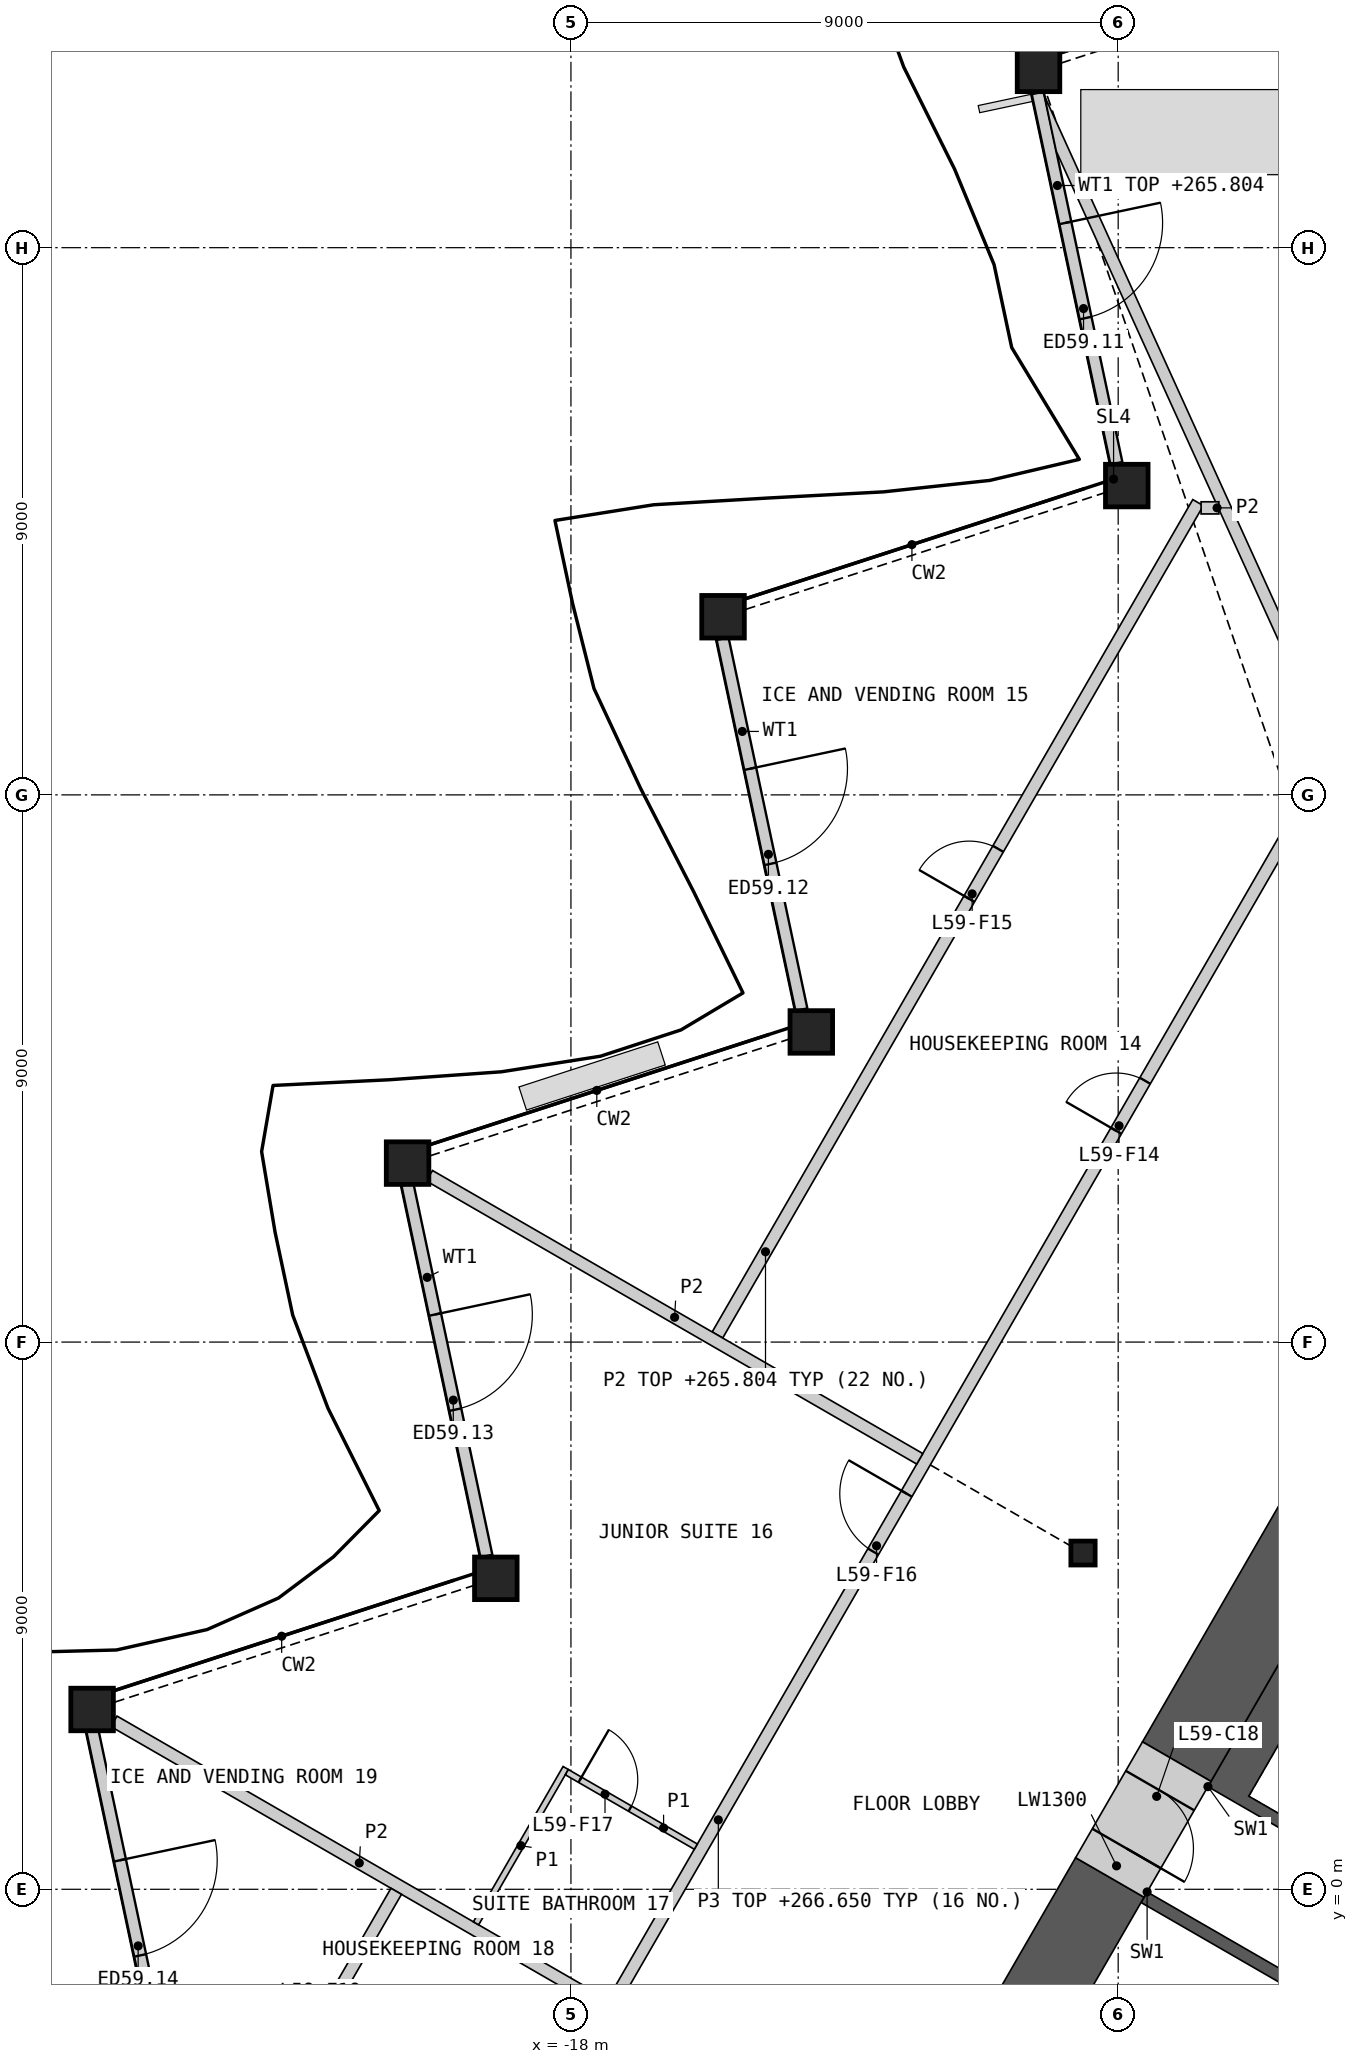
"""IFC4 building model, lengths in metres.
Left out: names, types, materials, properties, quantities, classifications, styles, units other than length and angle.
Written with IfcOpenShell. Run it as: python <this file> out.ifc"""

import sys

from ifc_helpers import new_model, si_unit, direction, frame, frame_2d, origin, origin_2d, place, context, subcontext, project, spatial, polyline, rectangle, hollow_rectangle, i_section, outline, extrude, element, fill, save


model = new_model("IFC4")
c1 = context("Model", 3, precision=1e-05, world=origin(), true_north=direction((0.0, 1.0)))
c2 = subcontext(c1, "Body", "Model", "MODEL_VIEW")
j1 = project(units=[si_unit("LENGTHUNIT", "METRE"), si_unit("PLANEANGLEUNIT", "RADIAN")], contexts=[c1])
p1 = place(None, origin())
s1 = spatial("IfcSite", under=j1, at=p1, CompositionType="ELEMENT")
p2 = place(p1, origin())
s2 = spatial("IfcBuilding", under=s1, at=p2, CompositionType="ELEMENT")
p3 = place(p2, frame((0.0, 0.0, 263.4)))
s3 = spatial("IfcBuildingStorey", under=s2, at=p3, CompositionType="ELEMENT", Elevation=263.4)
for number, where, z_axis, x_axis in (
    (1, (-10.31, 29.916, 0.0), (0.0, 0.0, 1.0), (1.0, 0.0, 0.0)),
    (2, (-8.859, 23.087, 0.0), (0.0, 0.0, 1.0), (1.0, 0.0, 0.0)),
    (3, (-15.499, 20.93, 0.0), (0.0, 0.0, 1.0), (1.0, 0.0, 0.0)),
    (4, (-14.047, 14.101, 0.0), (0.0, 0.0, 1.0), (1.0, 0.0, 0.0)),
    (5, (-20.687, 11.943, 0.0), (0.0, 0.0, 1.0), (1.0, 0.0, 0.0)),
    (6, (-19.235, 5.115, 0.0), (0.0, 0.0, 1.0), (1.0, 0.0, 0.0)),
    (7, (-25.875, 2.957, 0.0), (0.0, 0.0, 1.0), (1.0, 0.0, 0.0)),
):
    element("IfcColumn", number, at=place(p3, frame(where, z_axis=z_axis, x_axis=x_axis)), inside=s3, PredefinedType="COLUMN", context=c2, shape_type="SweptSolid", body=[
        extrude(hollow_rectangle(XDim=0.7, YDim=0.7, WallThickness=0.045, at=origin_2d()), origin(), (0.0, 0.0, 1.0), 3.6),
    ])
p4 = place(p3, frame((-9.578, 5.53, 0.0), z_axis=(0.0, 0.0, 1.0), x_axis=(1.0, 0.0, 0.0)))
e8 = element("IfcColumn", 8, at=p4, inside=s3, PredefinedType="COLUMN", context=c2, shape_type="SweptSolid", body=[
    extrude(i_section(OverallWidth=0.399, OverallDepth=0.393, WebThickness=0.023, FlangeThickness=0.037, at=origin_2d()), origin(), (0.0, 0.0, 1.0), 3.6),
])
p5 = place(p3, frame((-10.324, 29.545, 0.0), z_axis=(0.0, 0.0, 1.0), x_axis=(0.207930490886, -0.978143604467, 0.0)))
e9 = element("IfcWall", 9, at=p5, inside=s3, PredefinedType="SOLIDWALL", context=c2, shape_type="SweptSolid", body=[
    extrude(rectangle(XDim=6.228, YDim=0.2, at=frame_2d((3.114, 0.0))), origin(), (0.0, 0.0, 1.0), 2.404),
])
p6 = place(p5, frame((2.186, 0.0, 0.0)))
e10 = element("IfcOpeningElement", 10, at=p6, cuts=e9, PredefinedType="OPENING", context=c2, shape_type="SweptSolid", body=[
    extrude(rectangle(XDim=1.6, YDim=2.4, at=frame_2d((0.8, 1.2))), frame((0.0, 0.11, 0.0), z_axis=(0.0, -1.0, 0.0), x_axis=(1.0, 0.0, 0.0)), (0.0, 0.0, 1.0), 0.22),
])
p7 = place(p3, frame((-15.506, 20.569, 0.0), z_axis=(0.0, 0.0, 1.0), x_axis=(0.207911652145, -0.978147608954, 0.0)))
e11 = element("IfcWall", 11, at=p7, inside=s3, PredefinedType="SOLIDWALL", context=c2, shape_type="SweptSolid", body=[
    extrude(rectangle(XDim=6.238, YDim=0.2, at=frame_2d((3.119, 0.0))), origin(), (0.0, 0.0, 1.0), 2.701),
])
p8 = place(p7, frame((2.186, 0.0, 0.0)))
e12 = element("IfcOpeningElement", 12, at=p8, cuts=e11, PredefinedType="OPENING", context=c2, shape_type="SweptSolid", body=[
    extrude(rectangle(XDim=1.6, YDim=2.4, at=frame_2d((0.8, 1.2))), frame((0.0, 0.11, 0.0), z_axis=(0.0, -1.0, 0.0), x_axis=(1.0, 0.0, 0.0)), (0.0, 0.0, 1.0), 0.22),
])
p9 = place(p3, frame((-20.689, 11.592, 0.0), z_axis=(0.0, 0.0, 1.0), x_axis=(0.207900820141, -0.978149911304, 0.0)))
e13 = element("IfcWall", 13, at=p9, inside=s3, PredefinedType="SOLIDWALL", context=c2, shape_type="SweptSolid", body=[
    extrude(rectangle(XDim=6.247, YDim=0.2, at=frame_2d((3.124, 0.0))), origin(), (0.0, 0.0, 1.0), 2.701),
])
p10 = place(p9, frame((2.186, 0.0, 0.0)))
e14 = element("IfcOpeningElement", 14, at=p10, cuts=e13, PredefinedType="OPENING", context=c2, shape_type="SweptSolid", body=[
    extrude(rectangle(XDim=1.6, YDim=2.4, at=frame_2d((0.8, 1.2))), frame((0.0, 0.11, 0.0), z_axis=(0.0, -1.0, 0.0), x_axis=(1.0, 0.0, 0.0)), (0.0, 0.0, 1.0), 0.22),
])
p11 = place(p3, frame((-25.872, 2.615, 0.0), z_axis=(0.0, 0.0, 1.0), x_axis=(0.207882087744, -0.978153892593, 0.0)))
e15 = element("IfcWall", 15, at=p11, inside=s3, PredefinedType="SOLIDWALL", context=c2, shape_type="SweptSolid", body=[
    extrude(rectangle(XDim=6.257, YDim=0.2, at=frame_2d((3.129, 0.0))), origin(), (0.0, 0.0, 1.0), 2.701),
])
p12 = place(p11, frame((2.186, 0.0, 0.0)))
e16 = element("IfcOpeningElement", 16, at=p12, cuts=e15, PredefinedType="OPENING", context=c2, shape_type="SweptSolid", body=[
    extrude(rectangle(XDim=1.6, YDim=2.4, at=frame_2d((0.8, 1.2))), frame((0.0, 0.11, 0.0), z_axis=(0.0, -1.0, 0.0), x_axis=(1.0, 0.0, 0.0)), (0.0, 0.0, 1.0), 0.22),
])
p13 = place(p3, origin())
e17 = element("IfcWall", 17, at=p13, inside=s3, PredefinedType="SHEAR", context=c2, shape_type="SweptSolid", body=[
    extrude(outline(polyline([(-7.524, 1.688), (-4.124, 7.577), (-3.731, 7.35), (-1.561, 6.097), (-1.66, 5.924), (-3.652, 7.074), (-4.652, 5.342), (-2.66, 4.192), (-2.76, 4.019), (-4.752, 5.169), (-5.752, 3.437), (-3.76, 2.287), (-3.861, 2.113), (-5.852, 3.263), (-6.852, 1.531), (-4.861, 0.381), (-4.96, 0.208), (-7.131, 1.461), (-7.524, 1.688)])), origin(), (0.0, 0.0, 1.0), 3.25),
])
p14 = place(p3, origin())
e18 = element("IfcWall", 18, at=p14, inside=s3, PredefinedType="SHEAR", context=c2, shape_type="SweptSolid", body=[
    extrude(outline(polyline([(-8.524, -0.044), (-8.131, -0.271), (-5.96, -1.524), (-6.061, -1.697), (-8.231, -0.444), (-8.624, -0.217), (-8.524, -0.044)])), origin(), (0.0, 0.0, 1.0), 3.25),
])
p15 = place(p3, origin())
e19 = element("IfcWall", 19, at=p15, inside=s3, PredefinedType="SHEAR", context=c2, shape_type="SweptSolid", body=[
    extrude(outline(polyline([(-5.307, -1.281), (-10.374, -4.206), (-10.032, -4.298), (-5.182, -1.498), (-5.307, -1.281)])), origin(), (0.0, 0.0, 1.0), 3.25),
])
p16 = place(p3, frame((-4.636, 7.99, 0.0), z_axis=(0.0, 0.0, 1.0), x_axis=(-0.500022813292, -0.866012232124, 0.0)))
e20 = element("IfcWall", 20, at=p16, inside=s3, PredefinedType="SHEAR", context=c2, shape_type="SweptSolid", body=[
    extrude(rectangle(XDim=6.802, YDim=1.3, at=frame_2d((3.401, 0.0))), origin(), (0.0, 0.0, 1.0), 3.25),
])
p17 = place(p3, frame((-9.137, 0.195, 0.0), z_axis=(0.0, 0.0, 1.0), x_axis=(-0.499985697398, -0.866033661238, 0.0)))
e21 = element("IfcWall", 21, at=p17, inside=s3, PredefinedType="SHEAR", context=c2, shape_type="SweptSolid", body=[
    extrude(rectangle(XDim=4.362, YDim=1.3, at=frame_2d((2.181, 0.0))), origin(), (0.0, 0.0, 1.0), 3.25),
])
p18 = place(p3, frame((-8.037, 2.1, 0.0), z_axis=(0.0, 0.0, 1.0), x_axis=(-0.50002983664, -0.866008176907, 0.0)))
e22 = element("IfcWall", 22, at=p18, inside=s3, PredefinedType="SHEAR", context=c2, shape_type="SweptSolid", body=[
    extrude(rectangle(XDim=2.2, YDim=1.3, at=frame_2d((1.1, 0.0))), origin(), (0.0, 0.0, 1.0), 3.25),
])
p19 = place(p18, frame((0.55, 0.0, 0.0)))
e23 = element("IfcOpeningElement", 23, at=p19, cuts=e22, PredefinedType="OPENING", context=c2, shape_type="SweptSolid", body=[
    extrude(rectangle(XDim=1.1, YDim=2.1, at=frame_2d((0.55, 1.05))), frame((0.0, 0.66, 0.0), z_axis=(0.0, -1.0, 0.0), x_axis=(1.0, 0.0, 0.0)), (0.0, 0.0, 1.0), 1.32),
])
p20 = place(p3, frame((-18.976, -4.747, 0.0), z_axis=(0.0, 0.0, 1.0), x_axis=(0.499999852422, 0.866025488988, 0.0)))
e24 = element("IfcWall", 24, at=p20, inside=s3, PredefinedType="PARTITIONING", context=c2, shape_type="SweptSolid", body=[
    extrude(rectangle(XDim=27.198, YDim=0.2, at=frame_2d((13.599, 0.0))), origin(), (0.0, 0.0, 1.0), 3.25),
])
p21 = place(p20, frame((19.886, 0.0, 0.0)))
e25 = element("IfcOpeningElement", 25, at=p21, cuts=e24, PredefinedType="OPENING", context=c2, shape_type="SweptSolid", body=[
    extrude(rectangle(XDim=0.95, YDim=2.1, at=frame_2d((0.475, 1.05))), frame((0.0, 0.11, 0.0), z_axis=(0.0, -1.0, 0.0), x_axis=(1.0, 0.0, 0.0)), (0.0, 0.0, 1.0), 0.22),
])
p22 = place(p20, frame((11.895, 0.0, 0.0)))
e26 = element("IfcOpeningElement", 26, at=p22, cuts=e24, PredefinedType="OPENING", context=c2, shape_type="SweptSolid", body=[
    extrude(rectangle(XDim=1.1, YDim=2.1, at=frame_2d((0.55, 1.05))), frame((0.0, 0.11, 0.0), z_axis=(0.0, -1.0, 0.0), x_axis=(1.0, 0.0, 0.0)), (0.0, 0.0, 1.0), 0.22),
])
p23 = place(p20, frame((1.152, 0.0, 0.0)))
e27 = element("IfcOpeningElement", 27, at=p23, cuts=e24, PredefinedType="OPENING", context=c2, shape_type="SweptSolid", body=[
    extrude(rectangle(XDim=0.95, YDim=2.1, at=frame_2d((0.475, 1.05))), frame((0.0, 0.11, 0.0), z_axis=(0.0, -1.0, 0.0), x_axis=(1.0, 0.0, 0.0)), (0.0, 0.0, 1.0), 0.22),
])
p24 = place(p3, frame((-15.591, 9.117, 0.0), z_axis=(0.0, 0.0, 1.0), x_axis=(0.499994281579, 0.866028705291, 0.0)))
e28 = element("IfcWall", 28, at=p24, inside=s3, PredefinedType="PARTITIONING", context=c2, shape_type="SweptSolid", body=[
    extrude(rectangle(XDim=15.808, YDim=0.2, at=frame_2d((7.904, 0.0))), origin(), (0.0, 0.0, 1.0), 2.404),
])
p25 = place(p24, frame((8.283, 0.0, 0.0)))
e29 = element("IfcOpeningElement", 29, at=p25, cuts=e28, PredefinedType="OPENING", context=c2, shape_type="SweptSolid", body=[
    extrude(rectangle(XDim=0.95, YDim=2.1, at=frame_2d((0.475, 1.05))), frame((0.0, 0.11, 0.0), z_axis=(0.0, -1.0, 0.0), x_axis=(1.0, 0.0, 0.0)), (0.0, 0.0, 1.0), 0.22),
])
p26 = place(p3, origin())
e30 = element("IfcWall", 30, at=p26, inside=s3, PredefinedType="PARTITIONING", context=c2, shape_type="SweptSolid", body=[
    extrude(outline(polyline([(-5.56, 18.77), (-10.017, 28.582), (-10.21, 29.491), (-5.377, 18.853), (-5.56, 18.77)])), origin(), (0.0, 0.0, 1.0), 2.404),
])
p27 = place(p3, frame((-25.515, 2.762, 0.0), z_axis=(0.0, 0.0, 1.0), x_axis=(0.866025446298, -0.499999926364, 0.0)))
e31 = element("IfcWall", 31, at=p27, inside=s3, PredefinedType="PARTITIONING", context=c2, shape_type="SweptSolid", body=[
    extrude(rectangle(XDim=9.317, YDim=0.2, at=frame_2d((4.659, 0.0))), origin(), (0.0, 0.0, 1.0), 2.404),
])
p28 = place(p3, frame((-20.327, 11.736, 0.0), z_axis=(0.0, 0.0, 1.0), x_axis=(0.866022277917, -0.500005414122, 0.0)))
e32 = element("IfcWall", 32, at=p28, inside=s3, PredefinedType="PARTITIONING", context=c2, shape_type="SweptSolid", body=[
    extrude(rectangle(XDim=9.311, YDim=0.2, at=frame_2d((4.656, 0.0))), origin(), (0.0, 0.0, 1.0), 2.404),
])
p29 = place(p3, frame((-23.595, -4.747, 0.0), z_axis=(0.0, 0.0, 1.0), x_axis=(0.500003308737, 0.866023493476, 0.0)))
e33 = element("IfcWall", 33, at=p29, inside=s3, PredefinedType="PARTITIONING", context=c2, shape_type="SweptSolid", body=[
    extrude(rectangle(XDim=5.443, YDim=0.2, at=frame_2d((2.721, 0.0))), origin(), (0.0, 0.0, 1.0), 2.404),
])
p30 = place(p29, frame((2.093, 0.0, 0.0)))
e34 = element("IfcOpeningElement", 34, at=p30, cuts=e33, PredefinedType="OPENING", context=c2, shape_type="SweptSolid", body=[
    extrude(rectangle(XDim=0.95, YDim=2.1, at=frame_2d((0.475, 1.05))), frame((0.0, 0.11, 0.0), z_axis=(0.0, -1.0, 0.0), x_axis=(1.0, 0.0, 0.0)), (0.0, 0.0, 1.0), 0.22),
])
p31 = place(p3, frame((-7.636, 22.72, 0.0), z_axis=(0.0, 0.0, 1.0), x_axis=(1.0, 0.0, 0.0)))
e35 = element("IfcWall", 35, at=p31, inside=s3, PredefinedType="PARTITIONING", context=c2, shape_type="SweptSolid", body=[
    extrude(rectangle(XDim=0.292, YDim=0.2, at=frame_2d((0.146, 0.0))), origin(), (0.0, 0.0, 1.0), 2.404),
])
p32 = place(p3, frame((-19.561, -0.56, 0.0), z_axis=(0.0, 0.0, 1.0), x_axis=(0.49997559174, 0.866039495442, 0.0)))
e36 = element("IfcWall", 36, at=p32, inside=s3, PredefinedType="PARTITIONING", context=c2, shape_type="SweptSolid", body=[
    extrude(rectangle(XDim=2.95, YDim=0.1, at=frame_2d((1.475, 0.0))), origin(), (0.0, 0.0, 1.0), 2.404),
])
p33 = place(p3, frame((-18.068, 1.927, 0.0), z_axis=(0.0, 0.0, 1.0), x_axis=(0.866014668023, -0.500018594424, 0.0)))
e37 = element("IfcWall", 37, at=p33, inside=s3, PredefinedType="PARTITIONING", context=c2, shape_type="SweptSolid", body=[
    extrude(rectangle(XDim=2.45, YDim=0.1, at=frame_2d((1.225, 0.0))), origin(), (0.0, 0.0, 1.0), 2.404),
])
p34 = place(p33, frame((0.25, 0.0, 0.0)))
e38 = element("IfcOpeningElement", 38, at=p34, cuts=e37, PredefinedType="OPENING", context=c2, shape_type="SweptSolid", body=[
    extrude(rectangle(XDim=0.95, YDim=2.1, at=frame_2d((0.475, 1.05))), frame((0.0, 0.06, 0.0), z_axis=(0.0, -1.0, 0.0), x_axis=(1.0, 0.0, 0.0)), (0.0, 0.0, 1.0), 0.12),
])
p35 = place(p6, origin())
e39 = element("IfcDoor", 39, at=p35, inside=s3, OperationType="DOUBLE_DOOR_SINGLE_SWING", PredefinedType="DOOR", context=c2, shape_type="SweptSolid", body=[
    extrude(rectangle(XDim=1.6, YDim=2.4, at=frame_2d((0.8, 1.2))), frame((0.0, 0.025, 0.0), z_axis=(0.0, -1.0, 0.0), x_axis=(1.0, 0.0, 0.0)), (0.0, 0.0, 1.0), 0.05),
])
fill(e10, e39)
p36 = place(p8, origin())
e40 = element("IfcDoor", 40, at=p36, inside=s3, OperationType="DOUBLE_DOOR_SINGLE_SWING", PredefinedType="DOOR", context=c2, shape_type="SweptSolid", body=[
    extrude(rectangle(XDim=1.6, YDim=2.4, at=frame_2d((0.8, 1.2))), frame((0.0, 0.025, 0.0), z_axis=(0.0, -1.0, 0.0), x_axis=(1.0, 0.0, 0.0)), (0.0, 0.0, 1.0), 0.05),
])
fill(e12, e40)
p37 = place(p10, origin())
e41 = element("IfcDoor", 41, at=p37, inside=s3, OperationType="DOUBLE_DOOR_SINGLE_SWING", PredefinedType="DOOR", context=c2, shape_type="SweptSolid", body=[
    extrude(rectangle(XDim=1.6, YDim=2.4, at=frame_2d((0.8, 1.2))), frame((0.0, 0.025, 0.0), z_axis=(0.0, -1.0, 0.0), x_axis=(1.0, 0.0, 0.0)), (0.0, 0.0, 1.0), 0.05),
])
fill(e14, e41)
p38 = place(p12, origin())
e42 = element("IfcDoor", 42, at=p38, inside=s3, OperationType="DOUBLE_DOOR_SINGLE_SWING", PredefinedType="DOOR", context=c2, shape_type="SweptSolid", body=[
    extrude(rectangle(XDim=1.6, YDim=2.4, at=frame_2d((0.8, 1.2))), frame((0.0, 0.025, 0.0), z_axis=(0.0, -1.0, 0.0), x_axis=(1.0, 0.0, 0.0)), (0.0, 0.0, 1.0), 0.05),
])
fill(e16, e42)
p39 = place(p19, origin())
e43 = element("IfcDoor", 43, at=p39, inside=s3, OperationType="SINGLE_SWING_RIGHT", PredefinedType="DOOR", context=c2, shape_type="SweptSolid", body=[
    extrude(rectangle(XDim=1.1, YDim=2.1, at=frame_2d((0.55, 1.05))), frame((0.0, 0.405, 0.0), z_axis=(0.0, -1.0, 0.0), x_axis=(1.0, 0.0, 0.0)), (0.0, 0.0, 1.0), 0.05),
])
fill(e23, e43)
p40 = place(p21, origin())
e44 = element("IfcDoor", 44, at=p40, inside=s3, OperationType="SINGLE_SWING_LEFT", PredefinedType="DOOR", context=c2, shape_type="SweptSolid", body=[
    extrude(rectangle(XDim=0.95, YDim=2.1, at=frame_2d((0.475, 1.05))), frame((0.0, 0.025, 0.0), z_axis=(0.0, -1.0, 0.0), x_axis=(1.0, 0.0, 0.0)), (0.0, 0.0, 1.0), 0.05),
])
fill(e25, e44)
p41 = place(p25, origin())
e45 = element("IfcDoor", 45, at=p41, inside=s3, OperationType="SINGLE_SWING_LEFT", PredefinedType="DOOR", context=c2, shape_type="SweptSolid", body=[
    extrude(rectangle(XDim=0.95, YDim=2.1, at=frame_2d((0.475, 1.05))), frame((0.0, 0.025, 0.0), z_axis=(0.0, -1.0, 0.0), x_axis=(1.0, 0.0, 0.0)), (0.0, 0.0, 1.0), 0.05),
])
fill(e29, e45)
p42 = place(p22, origin())
e46 = element("IfcDoor", 46, at=p42, inside=s3, OperationType="SINGLE_SWING_RIGHT", PredefinedType="DOOR", context=c2, shape_type="SweptSolid", body=[
    extrude(rectangle(XDim=1.1, YDim=2.1, at=frame_2d((0.55, 1.05))), frame((0.0, 0.025, 0.0), z_axis=(0.0, -1.0, 0.0), x_axis=(1.0, 0.0, 0.0)), (0.0, 0.0, 1.0), 0.05),
])
fill(e26, e46)
p43 = place(p34, origin())
e47 = element("IfcDoor", 47, at=p43, inside=s3, OperationType="SINGLE_SWING_LEFT", PredefinedType="DOOR", context=c2, shape_type="SweptSolid", body=[
    extrude(rectangle(XDim=0.95, YDim=2.1, at=frame_2d((0.475, 1.05))), frame((0.0, 0.025, 0.0), z_axis=(0.0, -1.0, 0.0), x_axis=(1.0, 0.0, 0.0)), (0.0, 0.0, 1.0), 0.05),
])
fill(e38, e47)
save(model, sys.argv[1])
